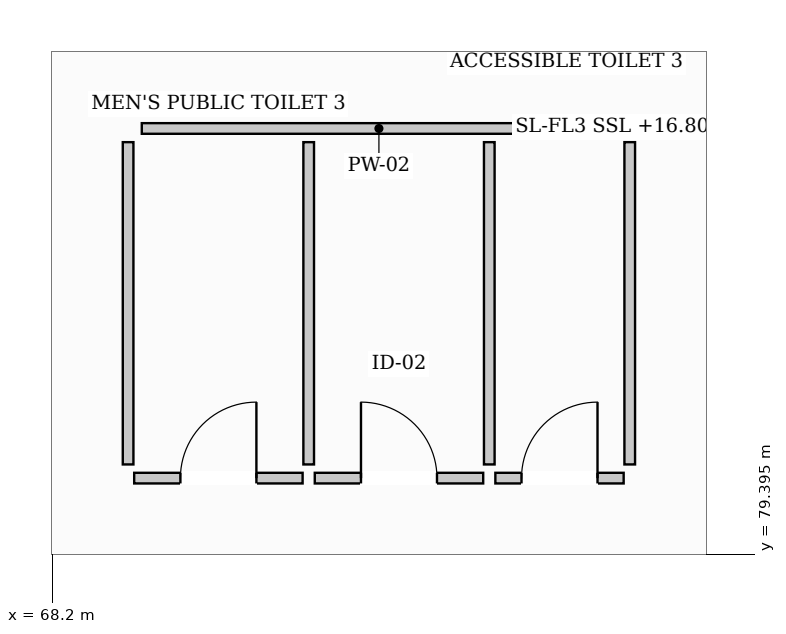
"""IFC4 building model, lengths in metres.
Left out: names, types, materials, properties, quantities, classifications, styles, units other than length and angle.
Written with IfcOpenShell. Run it as: python <this file> out.ifc"""

import sys

from ifc_helpers import new_model, si_unit, direction, frame, frame_2d, origin, place, context, subcontext, project, spatial, rectangle, extrude, element, fill, save


model = new_model("IFC4")
c1 = context("Model", 3, precision=1e-05, world=origin(), true_north=direction((0.0, 1.0)))
c2 = subcontext(c1, "Body", "Model", "MODEL_VIEW")
j1 = project(units=[si_unit("LENGTHUNIT", "METRE"), si_unit("PLANEANGLEUNIT", "RADIAN")], contexts=[c1])
p1 = place(None, origin())
s1 = spatial("IfcSite", under=j1, at=p1, CompositionType="ELEMENT")
p2 = place(p1, origin())
s2 = spatial("IfcBuilding", under=s1, at=p2, CompositionType="ELEMENT")
p3 = place(p2, frame((0.0, 0.0, 16.8)))
s3 = spatial("IfcBuildingStorey", under=s2, at=p3, CompositionType="ELEMENT", Elevation=16.8)
p4 = place(p3, frame((69.38, 85.0, 0.0), z_axis=(0.0, 0.0, 1.0), x_axis=(1.0, 0.0, 0.0)))
e1 = element("IfcWall", 1, at=p4, inside=s3, PredefinedType="PARTITIONING", context=c2, shape_type="SweptSolid", body=[
    extrude(rectangle(XDim=6.24, YDim=0.14, at=frame_2d((3.12, 0.0))), origin(), (0.0, 0.0, 1.0), 3.1),
])
for number, where, z_axis, x_axis in (
    (2, (69.2, 80.58, 0.0), (0.0, 0.0, 1.0), (0.0, 1.0, 0.0)),
    (3, (75.8, 80.58, 0.0), (0.0, 0.0, 1.0), (0.0, 1.0, 0.0)),
    (4, (71.576, 80.58, 0.0), (0.0, 0.0, 1.0), (0.0, 1.0, 0.0)),
    (5, (73.952, 80.58, 0.0), (0.0, 0.0, 1.0), (0.0, 1.0, 0.0)),
):
    element("IfcWall", number, at=place(p3, frame(where, z_axis=z_axis, x_axis=x_axis)), inside=s3, PredefinedType="PARTITIONING", context=c2, shape_type="SweptSolid", body=[
        extrude(rectangle(XDim=4.24, YDim=0.14, at=frame_2d((2.12, 0.0))), origin(), (0.0, 0.0, 1.0), 3.34),
    ])
p5 = place(p3, frame((69.28, 80.4, 0.0), z_axis=(0.0, 0.0, 1.0), x_axis=(1.0, 0.0, 0.0)))
e6 = element("IfcWall", 6, at=p5, inside=s3, PredefinedType="PARTITIONING", context=c2, shape_type="SweptSolid", body=[
    extrude(rectangle(XDim=2.216, YDim=0.14, at=frame_2d((1.108, 0.0))), origin(), (0.0, 0.0, 1.0), 3.34),
])
p6 = place(p5, frame((0.608, 0.0, 0.0)))
e7 = element("IfcOpeningElement", 7, at=p6, cuts=e6, PredefinedType="OPENING", context=c2, shape_type="SweptSolid", body=[
    extrude(rectangle(XDim=1.0, YDim=2.15, at=frame_2d((0.5, 1.075))), frame((0.0, 0.08, 0.0), z_axis=(0.0, -1.0, 0.0), x_axis=(1.0, 0.0, 0.0)), (0.0, 0.0, 1.0), 0.16),
])
p7 = place(p3, frame((71.656, 80.4, 0.0), z_axis=(0.0, 0.0, 1.0), x_axis=(1.0, 0.0, 0.0)))
e8 = element("IfcWall", 8, at=p7, inside=s3, PredefinedType="PARTITIONING", context=c2, shape_type="SweptSolid", body=[
    extrude(rectangle(XDim=2.216, YDim=0.14, at=frame_2d((1.108, 0.0))), origin(), (0.0, 0.0, 1.0), 3.1),
])
p8 = place(p7, frame((0.608, 0.0, 0.0)))
e9 = element("IfcOpeningElement", 9, at=p8, cuts=e8, PredefinedType="OPENING", context=c2, shape_type="SweptSolid", body=[
    extrude(rectangle(XDim=1.0, YDim=2.15, at=frame_2d((0.5, 1.075))), frame((0.0, 0.08, 0.0), z_axis=(0.0, -1.0, 0.0), x_axis=(1.0, 0.0, 0.0)), (0.0, 0.0, 1.0), 0.16),
])
p9 = place(p3, frame((74.032, 80.4, 0.0), z_axis=(0.0, 0.0, 1.0), x_axis=(1.0, 0.0, 0.0)))
e10 = element("IfcWall", 10, at=p9, inside=s3, PredefinedType="PARTITIONING", context=c2, shape_type="SweptSolid", body=[
    extrude(rectangle(XDim=1.688, YDim=0.14, at=frame_2d((0.844, 0.0))), origin(), (0.0, 0.0, 1.0), 3.34),
])
p10 = place(p9, frame((0.344, 0.0, 0.0)))
e11 = element("IfcOpeningElement", 11, at=p10, cuts=e10, PredefinedType="OPENING", context=c2, shape_type="SweptSolid", body=[
    extrude(rectangle(XDim=1.0, YDim=2.15, at=frame_2d((0.5, 1.075))), frame((0.0, 0.08, 0.0), z_axis=(0.0, -1.0, 0.0), x_axis=(1.0, 0.0, 0.0)), (0.0, 0.0, 1.0), 0.16),
])
p11 = place(p6, origin())
e12 = element("IfcDoor", 12, at=p11, inside=s3, OperationType="SINGLE_SWING_RIGHT", PredefinedType="DOOR", context=c2, shape_type="SweptSolid", body=[
    extrude(rectangle(XDim=1.0, YDim=2.15, at=frame_2d((0.5, 1.075))), frame((0.0, 0.025, 0.0), z_axis=(0.0, -1.0, 0.0), x_axis=(1.0, 0.0, 0.0)), (0.0, 0.0, 1.0), 0.05),
])
fill(e7, e12)
p12 = place(p8, origin())
e13 = element("IfcDoor", 13, at=p12, inside=s3, OperationType="SINGLE_SWING_LEFT", PredefinedType="DOOR", context=c2, shape_type="SweptSolid", body=[
    extrude(rectangle(XDim=1.0, YDim=2.15, at=frame_2d((0.5, 1.075))), frame((0.0, 0.025, 0.0), z_axis=(0.0, -1.0, 0.0), x_axis=(1.0, 0.0, 0.0)), (0.0, 0.0, 1.0), 0.05),
])
fill(e9, e13)
p13 = place(p10, origin())
e14 = element("IfcDoor", 14, at=p13, inside=s3, OperationType="SINGLE_SWING_RIGHT", PredefinedType="DOOR", context=c2, shape_type="SweptSolid", body=[
    extrude(rectangle(XDim=1.0, YDim=2.15, at=frame_2d((0.5, 1.075))), frame((0.0, 0.025, 0.0), z_axis=(0.0, -1.0, 0.0), x_axis=(1.0, 0.0, 0.0)), (0.0, 0.0, 1.0), 0.05),
])
fill(e11, e14)
save(model, sys.argv[1])
